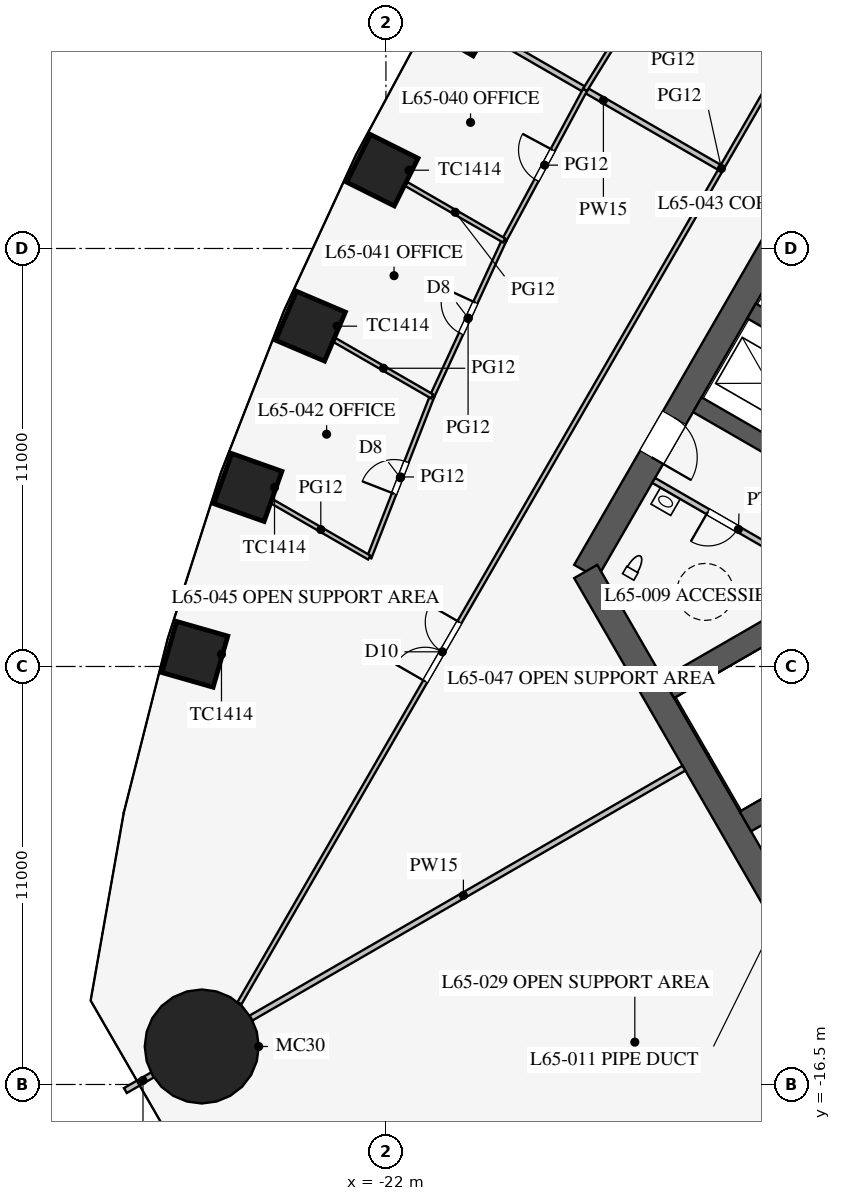
"""IFC4 building model, lengths in metres.
Left out: names, types, materials, properties, quantities, classifications, styles, units other than length and angle.
Written with IfcOpenShell. Run it as: python <this file> out.ifc"""

import sys

from ifc_helpers import new_model, si_unit, direction, frame, frame_2d, origin, origin_2d, place, context, subcontext, project, spatial, rectangle, circle, extrude, element, fill, save


model = new_model("IFC4")
c1 = context("Model", 3, precision=1e-05, world=origin(), true_north=direction((0.0, 1.0)))
c2 = subcontext(c1, "Body", "Model", "MODEL_VIEW")
j1 = project(units=[si_unit("LENGTHUNIT", "METRE"), si_unit("PLANEANGLEUNIT", "RADIAN")], contexts=[c1])
p1 = place(None, origin())
s1 = spatial("IfcSite", under=j1, at=p1, CompositionType="ELEMENT")
p2 = place(p1, origin())
s2 = spatial("IfcBuilding", under=s1, at=p2, CompositionType="ELEMENT")
p3 = place(p2, frame((0.0, 0.0, 284.7)))
s3 = spatial("IfcBuildingStorey", under=s2, at=p3, CompositionType="ELEMENT", Elevation=284.7)
for number, where, z_axis, x_axis in (
    (1, (-19.963, 11.526, 0.0), (0.0, 0.0, 1.0), (-0.5, -0.866, 0.0)),
    (2, (-22.094, 7.56, 0.0), (0.0, 0.0, 1.0), (-0.447, -0.895, 0.0)),
    (3, (-23.985, 3.455, 0.0), (0.0, 0.0, 1.0), (-0.391, -0.92, 0.0)),
    (4, (-25.632, -0.79, 0.0), (0.0, 0.0, 1.0), (-0.334, -0.942, 0.0)),
    (5, (-27.027, -5.18, 0.0), (0.0, 0.0, 1.0), (-0.275, -0.961, 0.0)),
):
    element("IfcColumn", number, at=place(p3, frame(where, z_axis=z_axis, x_axis=x_axis)), inside=s3, PredefinedType="COLUMN", context=c2, shape_type="SweptSolid", body=[
        extrude(rectangle(XDim=1.4, YDim=1.4, at=origin_2d()), origin(), (0.0, 0.0, 1.0), 4.2),
    ])
p4 = place(p3, frame((-26.847, -15.5, 0.0), z_axis=(0.0, 0.0, 1.0), x_axis=(1.0, 0.0, 0.0)))
e6 = element("IfcColumn", 6, at=p4, inside=s3, PredefinedType="COLUMN", context=c2, shape_type="SweptSolid", body=[
    extrude(circle(Radius=1.5, at=origin_2d()), origin(), (0.0, 0.0, 1.0), 4.2),
])
p5 = place(p3, frame((-5.773, 16.0, 0.0), z_axis=(0.0, 0.0, 1.0), x_axis=(-0.500002442456, -0.866023993627, 0.0)))
e7 = element("IfcWall", 7, at=p5, inside=s3, PredefinedType="SHEAR", context=c2, shape_type="SweptSolid", body=[
    extrude(rectangle(XDim=21.939, YDim=0.7, at=frame_2d((10.97, 0.0))), origin(), (0.0, 0.0, 1.0), 4.2),
])
p6 = place(p5, frame((17.27, 0.0, 0.0)))
e8 = element("IfcOpeningElement", 8, at=p6, cuts=e7, PredefinedType="OPENING", context=c2, shape_type="SweptSolid", body=[
    extrude(rectangle(XDim=1.2, YDim=2.1, at=frame_2d((0.6, 1.05))), frame((0.0, 0.36, 0.0), z_axis=(0.0, -1.0, 0.0), x_axis=(1.0, 0.0, 0.0)), (0.0, 0.0, 1.0), 0.72),
])
p7 = place(p5, frame((3.47, 0.0, 0.0)))
e9 = element("IfcOpeningElement", 9, at=p7, cuts=e7, PredefinedType="OPENING", context=c2, shape_type="SweptSolid", body=[
    extrude(rectangle(XDim=1.2, YDim=2.1, at=frame_2d((0.6, 1.05))), frame((0.0, 0.36, 0.0), z_axis=(0.0, -1.0, 0.0), x_axis=(1.0, 0.0, 0.0)), (0.0, 0.0, 1.0), 0.72),
])
p8 = place(p3, frame((-16.743, -3.0, 0.0), z_axis=(0.0, 0.0, 1.0), x_axis=(0.499995765644, -0.866027848477, 0.0)))
e10 = element("IfcWall", 10, at=p8, inside=s3, PredefinedType="SHEAR", context=c2, shape_type="SweptSolid", body=[
    extrude(rectangle(XDim=11.547, YDim=0.7, at=frame_2d((5.773, 0.0))), origin(), (0.0, 0.0, 1.0), 4.2),
])
for number, where, z_axis, x_axis in (
    (11, (-10.107, 2.544, 0.0), (0.0, 0.0, 1.0), (-0.866, 0.5, 0.0)),
    (12, (-11.532, 0.076, 0.0), (0.0, 0.0, 1.0), (-0.866, 0.5, 0.0)),
):
    element("IfcWall", number, at=place(p3, frame(where, z_axis=z_axis, x_axis=x_axis)), inside=s3, PredefinedType="SHEAR", context=c2, shape_type="SweptSolid", body=[
        extrude(rectangle(XDim=2.625, YDim=0.45, at=frame_2d((1.312, 0.0))), origin(), (0.0, 0.0, 1.0), 4.2),
    ])
for number, where, z_axis, x_axis in (
    (13, (-6.663, -1.509, 0.0), (0.0, 0.0, 1.0), (-0.866, -0.5, 0.0)),
    (14, (-4.638, -5.016, 0.0), (0.0, 0.0, 1.0), (-0.866, -0.5, 0.0)),
):
    element("IfcWall", number, at=place(p3, frame(where, z_axis=z_axis, x_axis=x_axis)), inside=s3, PredefinedType="SHEAR", context=c2, shape_type="SweptSolid", body=[
        extrude(rectangle(XDim=9.125, YDim=0.6, at=frame_2d((4.562, 0.0))), origin(), (0.0, 0.0, 1.0), 4.2),
    ])
p9 = place(p3, frame((-10.495, -3.178, 0.0), z_axis=(0.0, 0.0, 1.0), x_axis=(-0.866037967349, 0.499978238636, 0.0)))
e15 = element("IfcWall", 15, at=p9, inside=s3, PredefinedType="PARTITIONING", context=c2, shape_type="SweptSolid", body=[
    extrude(rectangle(XDim=5.15, YDim=0.15, at=frame_2d((2.575, 0.0))), origin(), (0.0, 0.0, 1.0), 4.0),
])
p10 = place(p9, frame((2.6, 0.0, 0.0)))
e16 = element("IfcOpeningElement", 16, at=p10, cuts=e15, PredefinedType="OPENING", context=c2, shape_type="SweptSolid", body=[
    extrude(rectangle(XDim=0.9, YDim=2.1, at=frame_2d((0.45, 1.05))), frame((0.0, 0.085, 0.0), z_axis=(0.0, -1.0, 0.0), x_axis=(1.0, 0.0, 0.0)), (0.0, 0.0, 1.0), 0.17),
])
p11 = place(p3, frame((-14.159, -8.175, 0.0), z_axis=(0.0, 0.0, 1.0), x_axis=(-0.866026905467, -0.499997399001, 0.0)))
e17 = element("IfcWall", 17, at=p11, inside=s3, PredefinedType="PARTITIONING", context=c2, shape_type="SweptSolid", body=[
    extrude(rectangle(XDim=13.4, YDim=0.15, at=frame_2d((6.7, 0.0))), origin(), (0.0, 0.0, 1.0), 2.5),
])
p12 = place(p3, frame((-27.929, -16.125, 0.0), z_axis=(0.0, 0.0, 1.0), x_axis=(-0.866086810508, -0.499893625349, 0.0)))
e18 = element("IfcWall", 18, at=p12, inside=s3, PredefinedType="PARTITIONING", context=c2, shape_type="SweptSolid", body=[
    extrude(rectangle(XDim=1.07, YDim=0.15, at=frame_2d((0.535, 0.0))), origin(), (0.0, 0.0, 1.0), 2.5),
])
p13 = place(p3, frame((-13.224, 7.635, 0.0), z_axis=(0.0, 0.0, 1.0), x_axis=(-0.86602299963, 0.500004164094, 0.0)))
e19 = element("IfcWall", 19, at=p13, inside=s3, PredefinedType="PARTITIONING", context=c2, shape_type="SweptSolid", body=[
    extrude(rectangle(XDim=7.052, YDim=0.15, at=frame_2d((3.526, 0.0))), origin(), (0.0, 0.0, 1.0), 3.0),
])
p14 = place(p3, frame((-0.49, 29.571, 0.0), z_axis=(0.0, 0.0, 1.0), x_axis=(-0.499999496503, -0.866025694478, 0.0)))
e20 = element("IfcWall", 20, at=p14, inside=s3, PredefinedType="PARTITIONING", context=c2, shape_type="SweptSolid", body=[
    extrude(rectangle(XDim=50.728, YDim=0.12, at=frame_2d((25.364, 0.0))), origin(), (0.0, 0.0, 1.0), 2.9),
])
p15 = place(p14, frame((9.8, 0.0, 0.15)))
e21 = element("IfcOpeningElement", 21, at=p15, cuts=e20, PredefinedType="OPENING", context=c2, shape_type="SweptSolid", body=[
    extrude(rectangle(XDim=1.8, YDim=2.1, at=frame_2d((0.9, 1.05))), frame((0.0, 0.07, 0.0), z_axis=(0.0, -1.0, 0.0), x_axis=(1.0, 0.0, 0.0)), (0.0, 0.0, 1.0), 0.14),
])
p16 = place(p14, frame((39.15, 0.0, 0.15)))
e22 = element("IfcOpeningElement", 22, at=p16, cuts=e20, PredefinedType="OPENING", context=c2, shape_type="SweptSolid", body=[
    extrude(rectangle(XDim=1.8, YDim=2.1, at=frame_2d((0.9, 1.05))), frame((0.0, 0.07, 0.0), z_axis=(0.0, -1.0, 0.0), x_axis=(1.0, 0.0, 0.0)), (0.0, 0.0, 1.0), 0.14),
])
p17 = place(p3, frame((-16.759, 9.676, 0.0), z_axis=(0.0, 0.0, 1.0), x_axis=(-0.473524102582, -0.880780860529, 0.0)))
e23 = element("IfcWall", 23, at=p17, inside=s3, PredefinedType="PARTITIONING", context=c2, shape_type="SweptSolid", body=[
    extrude(rectangle(XDim=4.502, YDim=0.12, at=frame_2d((2.251, 0.0))), origin(), (0.0, 0.0, 1.0), 2.9),
])
p18 = place(p17, frame((1.8, 0.0, 0.15)))
e24 = element("IfcOpeningElement", 24, at=p18, cuts=e23, PredefinedType="OPENING", context=c2, shape_type="SweptSolid", body=[
    extrude(rectangle(XDim=0.9, YDim=2.1, at=frame_2d((0.45, 1.05))), frame((0.0, 0.07, 0.0), z_axis=(0.0, -1.0, 0.0), x_axis=(1.0, 0.0, 0.0)), (0.0, 0.0, 1.0), 0.14),
])
p19 = place(p3, frame((-18.891, 5.71, 0.0), z_axis=(0.0, 0.0, 1.0), x_axis=(-0.419335693458, -0.907831248742, 0.0)))
e25 = element("IfcWall", 25, at=p19, inside=s3, PredefinedType="PARTITIONING", context=c2, shape_type="SweptSolid", body=[
    extrude(rectangle(XDim=4.519, YDim=0.12, at=frame_2d((2.259, 0.0))), origin(), (0.0, 0.0, 1.0), 2.9),
])
p20 = place(p19, frame((1.8, 0.0, 0.15)))
e26 = element("IfcOpeningElement", 26, at=p20, cuts=e25, PredefinedType="OPENING", context=c2, shape_type="SweptSolid", body=[
    extrude(rectangle(XDim=0.9, YDim=2.1, at=frame_2d((0.45, 1.05))), frame((0.0, 0.07, 0.0), z_axis=(0.0, -1.0, 0.0), x_axis=(1.0, 0.0, 0.0)), (0.0, 0.0, 1.0), 0.14),
])
p21 = place(p3, frame((-20.786, 1.608, 0.0), z_axis=(0.0, 0.0, 1.0), x_axis=(-0.363212149153, -0.931706463811, 0.0)))
e27 = element("IfcWall", 27, at=p21, inside=s3, PredefinedType="PARTITIONING", context=c2, shape_type="SweptSolid", body=[
    extrude(rectangle(XDim=4.553, YDim=0.12, at=frame_2d((2.276, 0.0))), origin(), (0.0, 0.0, 1.0), 2.9),
])
p22 = place(p21, frame((1.85, 0.0, 0.15)))
e28 = element("IfcOpeningElement", 28, at=p22, cuts=e27, PredefinedType="OPENING", context=c2, shape_type="SweptSolid", body=[
    extrude(rectangle(XDim=0.9, YDim=2.1, at=frame_2d((0.45, 1.05))), frame((0.0, 0.07, 0.0), z_axis=(0.0, -1.0, 0.0), x_axis=(1.0, 0.0, 0.0)), (0.0, 0.0, 1.0), 0.14),
])
p23 = place(p3, frame((-14.391, 13.505, 0.0), z_axis=(0.0, 0.0, 1.0), x_axis=(-0.525996140194, -0.850486954927, 0.0)))
e29 = element("IfcWall", 29, at=p23, inside=s3, PredefinedType="PARTITIONING", context=c2, shape_type="SweptSolid", body=[
    extrude(rectangle(XDim=4.502, YDim=0.12, at=frame_2d((2.251, 0.0))), origin(), (0.0, 0.0, 1.0), 2.9),
])
p24 = place(p23, frame((1.8, 0.0, 0.15)))
e30 = element("IfcOpeningElement", 30, at=p24, cuts=e29, PredefinedType="OPENING", context=c2, shape_type="SweptSolid", body=[
    extrude(rectangle(XDim=0.9, YDim=2.1, at=frame_2d((0.45, 1.05))), frame((0.0, 0.07, 0.0), z_axis=(0.0, -1.0, 0.0), x_axis=(1.0, 0.0, 0.0)), (0.0, 0.0, 1.0), 0.14),
])
p25 = place(p3, frame((-22.439, -2.633, 0.0), z_axis=(0.0, 0.0, 1.0), x_axis=(-0.866019881867, 0.500009564119, 0.0)))
e31 = element("IfcWall", 31, at=p25, inside=s3, PredefinedType="PARTITIONING", context=c2, shape_type="SweptSolid", body=[
    extrude(rectangle(XDim=2.944, YDim=0.12, at=frame_2d((1.472, 0.0))), origin(), (0.0, 0.0, 1.0), 2.8),
])
p26 = place(p3, frame((-18.891, 5.71, 0.0), z_axis=(0.0, 0.0, 1.0), x_axis=(-0.866032134716, 0.499988341504, 0.0)))
e32 = element("IfcWall", 32, at=p26, inside=s3, PredefinedType="PARTITIONING", context=c2, shape_type="SweptSolid", body=[
    extrude(rectangle(XDim=2.967, YDim=0.12, at=frame_2d((1.484, 0.0))), origin(), (0.0, 0.0, 1.0), 2.9),
])
p27 = place(p3, frame((-20.786, 1.608, 0.0), z_axis=(0.0, 0.0, 1.0), x_axis=(-0.866056430242, 0.499946256749, 0.0)))
e33 = element("IfcWall", 33, at=p27, inside=s3, PredefinedType="PARTITIONING", context=c2, shape_type="SweptSolid", body=[
    extrude(rectangle(XDim=2.959, YDim=0.12, at=frame_2d((1.479, 0.0))), origin(), (0.0, 0.0, 1.0), 2.9),
])
p28 = place(p10, origin())
e34 = element("IfcDoor", 34, at=p28, inside=s3, OperationType="SINGLE_SWING_RIGHT", PredefinedType="DOOR", context=c2, shape_type="SweptSolid", body=[
    extrude(rectangle(XDim=0.9, YDim=2.1, at=frame_2d((0.45, 1.05))), frame((0.0, 0.025, 0.0), z_axis=(0.0, -1.0, 0.0), x_axis=(1.0, 0.0, 0.0)), (0.0, 0.0, 1.0), 0.05),
])
fill(e16, e34)
p29 = place(p6, origin())
e35 = element("IfcDoor", 35, at=p29, inside=s3, OperationType="SINGLE_SWING_RIGHT", PredefinedType="DOOR", context=c2, shape_type="SweptSolid", body=[
    extrude(rectangle(XDim=1.2, YDim=2.1, at=frame_2d((0.6, 1.05))), frame((0.0, 0.025, 0.0), z_axis=(0.0, -1.0, 0.0), x_axis=(1.0, 0.0, 0.0)), (0.0, 0.0, 1.0), 0.05),
])
fill(e8, e35)
p30 = place(p18, frame((0.9, 0.0, 0.0), z_axis=(0.0, 0.0, 1.0), x_axis=(-1.0, 0.0, 0.0)))
e36 = element("IfcDoor", 36, at=p30, inside=s3, OperationType="SINGLE_SWING_RIGHT", PredefinedType="DOOR", context=c2, shape_type="SweptSolid", body=[
    extrude(rectangle(XDim=0.9, YDim=2.1, at=frame_2d((0.45, 1.05))), frame((0.0, 0.025, 0.0), z_axis=(0.0, -1.0, 0.0), x_axis=(1.0, 0.0, 0.0)), (0.0, 0.0, 1.0), 0.05),
])
fill(e24, e36)
p31 = place(p20, frame((0.9, 0.0, 0.0), z_axis=(0.0, 0.0, 1.0), x_axis=(-1.0, 0.0, 0.0)))
e37 = element("IfcDoor", 37, at=p31, inside=s3, OperationType="SINGLE_SWING_RIGHT", PredefinedType="DOOR", context=c2, shape_type="SweptSolid", body=[
    extrude(rectangle(XDim=0.9, YDim=2.1, at=frame_2d((0.45, 1.05))), frame((0.0, 0.025, 0.0), z_axis=(0.0, -1.0, 0.0), x_axis=(1.0, 0.0, 0.0)), (0.0, 0.0, 1.0), 0.05),
])
fill(e26, e37)
p32 = place(p22, frame((0.9, 0.0, 0.0), z_axis=(0.0, 0.0, 1.0), x_axis=(-1.0, 0.0, 0.0)))
e38 = element("IfcDoor", 38, at=p32, inside=s3, OperationType="SINGLE_SWING_LEFT", PredefinedType="DOOR", context=c2, shape_type="SweptSolid", body=[
    extrude(rectangle(XDim=0.9, YDim=2.1, at=frame_2d((0.45, 1.05))), frame((0.0, 0.025, 0.0), z_axis=(0.0, -1.0, 0.0), x_axis=(1.0, 0.0, 0.0)), (0.0, 0.0, 1.0), 0.05),
])
fill(e28, e38)
p33 = place(p16, frame((1.8, 0.0, 0.0), z_axis=(0.0, 0.0, 1.0), x_axis=(-1.0, 0.0, 0.0)))
e39 = element("IfcDoor", 39, at=p33, inside=s3, OperationType="DOUBLE_DOOR_SINGLE_SWING", PredefinedType="DOOR", context=c2, shape_type="SweptSolid", body=[
    extrude(rectangle(XDim=1.8, YDim=2.1, at=frame_2d((0.9, 1.05))), frame((0.0, 0.025, 0.0), z_axis=(0.0, -1.0, 0.0), x_axis=(1.0, 0.0, 0.0)), (0.0, 0.0, 1.0), 0.05),
])
fill(e22, e39)
save(model, sys.argv[1])
